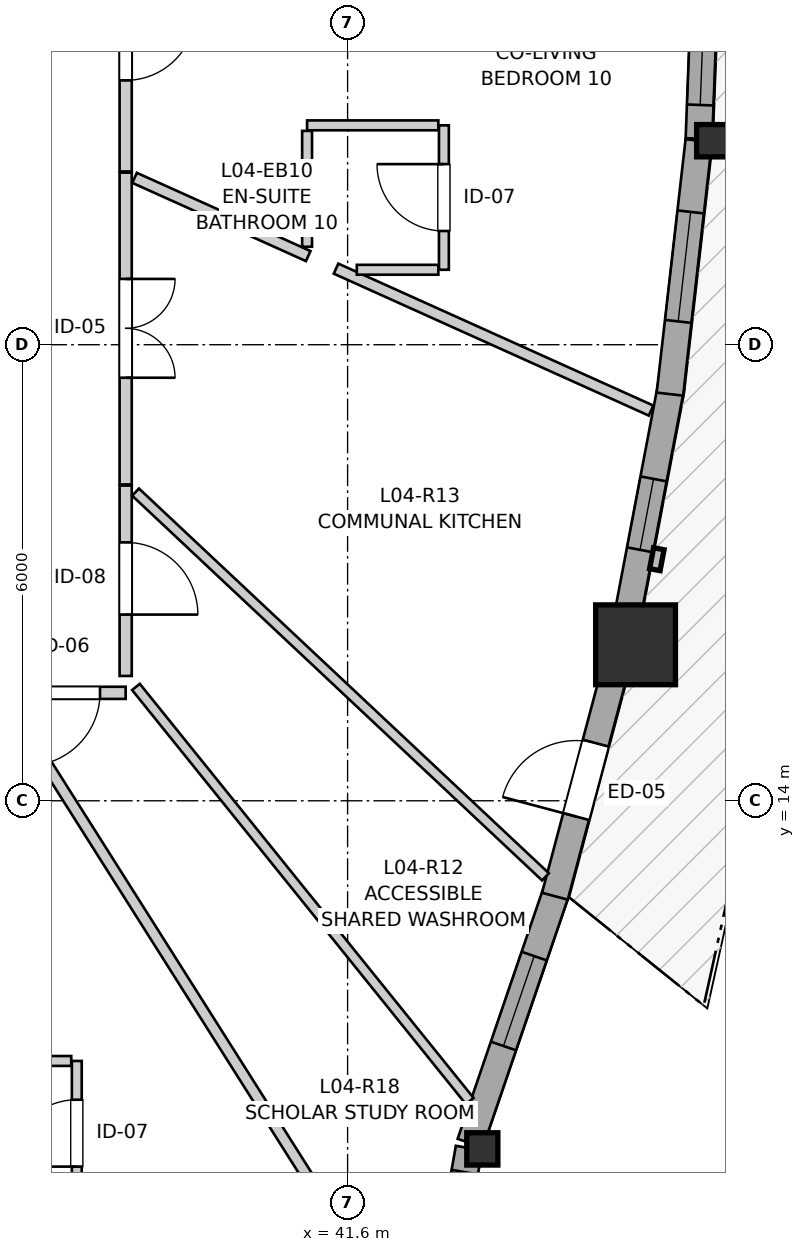
"""IFC4 building model, lengths in metres.
Left out: names, types, materials, properties, quantities, classifications, styles, units other than length and angle.
Written with IfcOpenShell. Run it as: python <this file> out.ifc"""

import sys

from ifc_helpers import new_model, si_unit, direction, frame, frame_2d, origin, origin_2d, place, context, subcontext, project, spatial, rectangle, i_section, extrude, source, transform, mapped, element, fill, save


model = new_model("IFC4")
c1 = context("Model", 3, precision=1e-05, world=origin(), true_north=direction((0.0, 1.0)))
c2 = subcontext(c1, "Body", "Model", "MODEL_VIEW")
j1 = project(units=[si_unit("LENGTHUNIT", "METRE"), si_unit("PLANEANGLEUNIT", "RADIAN")], contexts=[c1])
p1 = place(None, origin())
s1 = spatial("IfcSite", under=j1, at=p1, CompositionType="ELEMENT")
p2 = place(p1, origin())
s2 = spatial("IfcBuilding", under=s1, at=p2, CompositionType="ELEMENT")
p3 = place(p2, frame((0.0, 0.0, 17.4)))
s3 = spatial("IfcBuildingStorey", under=s2, at=p3, CompositionType="ELEMENT", Elevation=17.4)
m1 = source(origin(), c2, "Body", "SweptSolid", [
    extrude(i_section(OverallWidth=0.409, OverallDepth=0.425, WebThickness=0.03, FlangeThickness=0.048, FilletRadius=0.015, at=origin_2d()), origin(), (0.0, 0.0, 1.0), 2.94),
])
p4 = place(p3, frame((43.373, 9.42, 0.0), z_axis=(0.0, 0.0, 1.0), x_axis=(1.0, 0.0, 0.0)))
e1 = element("IfcColumn", 1, at=p4, inside=s3, PredefinedType="PILASTER", context=c2, shape_type="MappedRepresentation", body=[
    mapped(m1, transform((0.0, 0.0, 0.0), x_axis=(1.0, 0.0, 0.0), y_axis=(0.0, 1.0, 0.0), z_axis=(0.0, 0.0, 1.0), scale=1.0)),
])
m2 = source(origin(), c2, "Body", "SweptSolid", [
    extrude(rectangle(XDim=1.05, YDim=1.05, at=origin_2d()), origin(), (0.0, 0.0, 1.0), 2.94),
])
p5 = place(p3, frame((45.389, 16.052, 0.0), z_axis=(0.0, 0.0, 1.0), x_axis=(1.0, 0.0, 0.0)))
e2 = element("IfcColumn", 2, at=p5, inside=s3, PredefinedType="COLUMN", context=c2, shape_type="MappedRepresentation", body=[
    mapped(m2, transform((0.0, 0.0, 0.0), x_axis=(1.0, 0.0, 0.0), y_axis=(0.0, 1.0, 0.0), z_axis=(0.0, 0.0, 1.0), scale=1.0)),
])
p6 = place(p3, frame((46.397, 22.684, 0.0), z_axis=(0.0, 0.0, 1.0), x_axis=(1.0, 0.0, 0.0)))
e3 = element("IfcColumn", 3, at=p6, inside=s3, PredefinedType="PILASTER", context=c2, shape_type="MappedRepresentation", body=[
    mapped(m1, transform((0.0, 0.0, 0.0), x_axis=(1.0, 0.0, 0.0), y_axis=(0.0, 1.0, 0.0), z_axis=(0.0, 0.0, 1.0), scale=1.0)),
])
p7 = place(p3, frame((42.844, 7.429, 0.0), z_axis=(0.0, 0.0, 1.0), x_axis=(0.17370309897, 0.984798067326, 0.0)))
e4 = element("IfcWall", 4, at=p7, inside=s3, PredefinedType="SOLIDWALL", context=c2, shape_type="SweptSolid", body=[
    extrude(rectangle(XDim=2.032, YDim=0.35, at=frame_2d((1.016, 0.0))), origin(), (0.0, 0.0, 1.0), 2.42),
])
p8 = place(p7, frame((0.261, 0.0, 0.82)))
e5 = element("IfcOpeningElement", 5, at=p8, cuts=e4, PredefinedType="OPENING", context=c2, shape_type="SweptSolid", body=[
    extrude(rectangle(XDim=1.45, YDim=1.25, at=frame_2d((0.725, 0.625))), frame((0.0, 0.185, 0.0), z_axis=(0.0, -1.0, 0.0), x_axis=(1.0, 0.0, 0.0)), (0.0, 0.0, 1.0), 0.37),
])
p9 = place(p3, frame((43.213, 9.496, 0.0), z_axis=(0.0, 0.0, 1.0), x_axis=(0.323599506414, 0.946194144692, 0.0)))
e6 = element("IfcWall", 6, at=p9, inside=s3, PredefinedType="SOLIDWALL", context=c2, shape_type="SweptSolid", body=[
    extrude(rectangle(XDim=3.522, YDim=0.35, at=frame_2d((1.761, 0.0))), origin(), (0.0, 0.0, 1.0), 2.42),
])
p10 = place(p9, frame((1.351, 0.0, 0.82)))
e7 = element("IfcOpeningElement", 7, at=p10, cuts=e6, PredefinedType="OPENING", context=c2, shape_type="SweptSolid", body=[
    extrude(rectangle(XDim=1.25, YDim=1.35, at=frame_2d((0.625, 0.675))), frame((0.0, 0.185, 0.0), z_axis=(0.0, -1.0, 0.0), x_axis=(1.0, 0.0, 0.0)), (0.0, 0.0, 1.0), 0.37),
])
p11 = place(p3, frame((44.328, 12.744, 0.0), z_axis=(0.0, 0.0, 1.0), x_axis=(0.257063268192, 0.966394575806, 0.0)))
e8 = element("IfcWall", 8, at=p11, inside=s3, PredefinedType="SOLIDWALL", context=c2, shape_type="SweptSolid", body=[
    extrude(rectangle(XDim=3.169, YDim=0.35, at=frame_2d((1.584, 0.0))), origin(), (0.0, 0.0, 1.0), 2.42),
])
p12 = place(p11, frame((1.085, 0.0, 0.0)))
e9 = element("IfcOpeningElement", 9, at=p12, cuts=e8, PredefinedType="OPENING", context=c2, shape_type="SweptSolid", body=[
    extrude(rectangle(XDim=1.0, YDim=2.1, at=frame_2d((0.5, 1.05))), frame((0.0, 0.185, 0.0), z_axis=(0.0, -1.0, 0.0), x_axis=(1.0, 0.0, 0.0)), (0.0, 0.0, 1.0), 0.37),
])
p13 = place(p3, frame((45.273, 16.379, 0.0), z_axis=(0.0, 0.0, 1.0), x_axis=(0.186712111557, 0.982414671815, 0.0)))
e10 = element("IfcWall", 10, at=p13, inside=s3, PredefinedType="SOLIDWALL", context=c2, shape_type="SweptSolid", body=[
    extrude(rectangle(XDim=3.113, YDim=0.35, at=frame_2d((1.557, 0.0))), origin(), (0.0, 0.0, 1.0), 2.42),
])
p14 = place(p13, frame((0.939, 0.0, 0.82)))
e11 = element("IfcOpeningElement", 11, at=p14, cuts=e10, PredefinedType="OPENING", context=c2, shape_type="SweptSolid", body=[
    extrude(rectangle(XDim=0.95, YDim=1.35, at=frame_2d((0.475, 0.675))), frame((0.0, 0.185, 0.0), z_axis=(0.0, -1.0, 0.0), x_axis=(1.0, 0.0, 0.0)), (0.0, 0.0, 1.0), 0.37),
])
p15 = place(p3, frame((45.841, 19.35, 0.0), z_axis=(0.0, 0.0, 1.0), x_axis=(0.113290074291, 0.993561955324, 0.0)))
e12 = element("IfcWall", 12, at=p15, inside=s3, PredefinedType="SOLIDWALL", context=c2, shape_type="SweptSolid", body=[
    extrude(rectangle(XDim=3.355, YDim=0.35, at=frame_2d((1.678, 0.0))), origin(), (0.0, 0.0, 1.0), 2.42),
])
p16 = place(p15, frame((0.963, 0.0, 0.82)))
e13 = element("IfcOpeningElement", 13, at=p16, cuts=e12, PredefinedType="OPENING", context=c2, shape_type="SweptSolid", body=[
    extrude(rectangle(XDim=1.45, YDim=1.25, at=frame_2d((0.725, 0.625))), frame((0.0, 0.185, 0.0), z_axis=(0.0, -1.0, 0.0), x_axis=(1.0, 0.0, 0.0)), (0.0, 0.0, 1.0), 0.37),
])
p17 = place(p3, frame((46.223, 22.711, 0.0), z_axis=(0.0, 0.0, 1.0), x_axis=(0.037977854684, 0.999278581054, 0.0)))
e14 = element("IfcWall", 14, at=p17, inside=s3, PredefinedType="SOLIDWALL", context=c2, shape_type="SweptSolid", body=[
    extrude(rectangle(XDim=3.336, YDim=0.35, at=frame_2d((1.668, 0.0))), origin(), (0.0, 0.0, 1.0), 2.42),
])
p18 = place(p17, frame((0.444, 0.0, 0.82)))
e15 = element("IfcOpeningElement", 15, at=p18, cuts=e14, PredefinedType="OPENING", context=c2, shape_type="SweptSolid", body=[
    extrude(rectangle(XDim=1.75, YDim=1.3, at=frame_2d((0.875, 0.65))), frame((0.0, 0.185, 0.0), z_axis=(0.0, -1.0, 0.0), x_axis=(1.0, 0.0, 0.0)), (0.0, 0.0, 1.0), 0.37),
])
p19 = place(p3, frame((38.68, 22.264, 0.0), z_axis=(0.0, 0.0, 1.0), x_axis=(0.0, -1.0, 0.0)))
e16 = element("IfcWall", 16, at=p19, inside=s3, PredefinedType="PARTITIONING", context=c2, shape_type="SweptSolid", body=[
    extrude(rectangle(XDim=4.102, YDim=0.16, at=frame_2d((2.051, 0.0))), origin(), (0.0, 0.0, 1.0), 2.94),
])
p20 = place(p19, frame((1.398, 0.0, 0.0)))
e17 = element("IfcOpeningElement", 17, at=p20, cuts=e16, PredefinedType="OPENING", context=c2, shape_type="SweptSolid", body=[
    extrude(rectangle(XDim=1.3, YDim=2.1, at=frame_2d((0.65, 1.05))), frame((0.0, 0.09, 0.0), z_axis=(0.0, -1.0, 0.0), x_axis=(1.0, 0.0, 0.0)), (0.0, 0.0, 1.0), 0.18),
])
p21 = place(p3, frame((38.68, 25.642, 0.0), z_axis=(0.0, 0.0, 1.0), x_axis=(0.0, -1.0, 0.0)))
e18 = element("IfcWall", 18, at=p21, inside=s3, PredefinedType="PARTITIONING", context=c2, shape_type="SweptSolid", body=[
    extrude(rectangle(XDim=3.363, YDim=0.16, at=frame_2d((1.682, 0.0))), origin(), (0.0, 0.0, 1.0), 2.94),
])
p22 = place(p21, frame((1.244, 0.0, 0.0)))
e19 = element("IfcOpeningElement", 19, at=p22, cuts=e18, PredefinedType="OPENING", context=c2, shape_type="SweptSolid", body=[
    extrude(rectangle(XDim=0.92, YDim=2.1, at=frame_2d((0.46, 1.05))), frame((0.0, 0.09, 0.0), z_axis=(0.0, -1.0, 0.0), x_axis=(1.0, 0.0, 0.0)), (0.0, 0.0, 1.0), 0.18),
])
p23 = place(p3, frame((38.68, 18.147, 0.0), z_axis=(0.0, 0.0, 1.0), x_axis=(0.0, -1.0, 0.0)))
e20 = element("IfcWall", 20, at=p23, inside=s3, PredefinedType="PARTITIONING", context=c2, shape_type="SweptSolid", body=[
    extrude(rectangle(XDim=2.505, YDim=0.16, at=frame_2d((1.252, 0.0))), origin(), (0.0, 0.0, 1.0), 2.94),
])
p24 = place(p23, frame((0.748, 0.0, 0.0)))
e21 = element("IfcOpeningElement", 21, at=p24, cuts=e20, PredefinedType="OPENING", context=c2, shape_type="SweptSolid", body=[
    extrude(rectangle(XDim=0.95, YDim=2.1, at=frame_2d((0.475, 1.05))), frame((0.0, 0.09, 0.0), z_axis=(0.0, -1.0, 0.0), x_axis=(1.0, 0.0, 0.0)), (0.0, 0.0, 1.0), 0.18),
])
p25 = place(p3, frame((38.037, 8.75, 0.0), z_axis=(0.0, 0.0, 1.0), x_axis=(0.0, 1.0, 0.0)))
e22 = element("IfcWall", 22, at=p25, inside=s3, PredefinedType="PARTITIONING", context=c2, shape_type="SweptSolid", body=[
    extrude(rectangle(XDim=1.827, YDim=0.13, at=frame_2d((0.914, 0.0))), origin(), (0.0, 0.0, 1.0), 2.94),
])
p26 = place(p25, frame((0.437, 0.0, 0.0)))
e23 = element("IfcOpeningElement", 23, at=p26, cuts=e22, PredefinedType="OPENING", context=c2, shape_type="SweptSolid", body=[
    extrude(rectangle(XDim=0.88, YDim=2.05, at=frame_2d((0.44, 1.025))), frame((0.0, 0.075, 0.0), z_axis=(0.0, -1.0, 0.0), x_axis=(1.0, 0.0, 0.0)), (0.0, 0.0, 1.0), 0.15),
])
p27 = place(p3, frame((42.867, 20.986, 0.0), z_axis=(0.0, 0.0, 1.0), x_axis=(0.0, 1.0, 0.0)))
e24 = element("IfcWall", 24, at=p27, inside=s3, PredefinedType="PARTITIONING", context=c2, shape_type="SweptSolid", body=[
    extrude(rectangle(XDim=1.9, YDim=0.13, at=frame_2d((0.95, 0.0))), origin(), (0.0, 0.0, 1.0), 2.508),
])
p28 = place(p27, frame((0.51, 0.0, 0.0)))
e25 = element("IfcOpeningElement", 25, at=p28, cuts=e24, PredefinedType="OPENING", context=c2, shape_type="SweptSolid", body=[
    extrude(rectangle(XDim=0.88, YDim=2.05, at=frame_2d((0.44, 1.025))), frame((0.0, 0.075, 0.0), z_axis=(0.0, -1.0, 0.0), x_axis=(1.0, 0.0, 0.0)), (0.0, 0.0, 1.0), 0.15),
])
p29 = place(p3, frame((38.68, 15.42, 0.0), z_axis=(0.0, 0.0, 1.0), x_axis=(-1.0, 0.0, 0.0)))
e26 = element("IfcWall", 26, at=p29, inside=s3, PredefinedType="PARTITIONING", context=c2, shape_type="SweptSolid", body=[
    extrude(rectangle(XDim=1.602, YDim=0.16, at=frame_2d((0.801, 0.0))), origin(), (0.0, 0.0, 1.0), 2.94),
])
p30 = place(p29, frame((0.337, 0.0, 0.0)))
e27 = element("IfcOpeningElement", 27, at=p30, cuts=e26, PredefinedType="OPENING", context=c2, shape_type="SweptSolid", body=[
    extrude(rectangle(XDim=0.96, YDim=2.1, at=frame_2d((0.48, 1.05))), frame((0.0, 0.09, 0.0), z_axis=(0.0, -1.0, 0.0), x_axis=(1.0, 0.0, 0.0)), (0.0, 0.0, 1.0), 0.18),
])
p31 = place(p3, frame((37.125, 15.294, 0.0), z_axis=(0.0, 0.0, 1.0), x_axis=(0.534743765269, -0.845014263492, 0.0)))
e28 = element("IfcWall", 28, at=p31, inside=s3, PredefinedType="PARTITIONING", context=c2, shape_type="SweptSolid", body=[
    extrude(rectangle(XDim=9.797, YDim=0.145, at=frame_2d((4.899, 0.0))), origin(), (0.0, 0.0, 1.0), 2.94),
])
p32 = place(p3, frame((38.81, 18.061, 0.0), z_axis=(0.0, 0.0, 1.0), x_axis=(0.729196389153, -0.684304483433, 0.0)))
e29 = element("IfcWall", 29, at=p32, inside=s3, PredefinedType="PARTITIONING", context=c2, shape_type="SweptSolid", body=[
    extrude(rectangle(XDim=7.396, YDim=0.13, at=frame_2d((3.698, 0.0))), origin(), (0.0, 0.0, 1.0), 2.94),
])
p33 = place(p3, frame((38.816, 15.498, 0.0), z_axis=(0.0, 0.0, 1.0), x_axis=(0.627528755525, -0.778593386171, 0.0)))
e30 = element("IfcWall", 30, at=p33, inside=s3, PredefinedType="PARTITIONING", context=c2, shape_type="SweptSolid", body=[
    extrude(rectangle(XDim=6.998, YDim=0.13, at=frame_2d((3.499, 0.0))), origin(), (0.0, 0.0, 1.0), 2.94),
])
p34 = place(p3, frame((41.448, 21.001, 0.0), z_axis=(0.0, 0.0, 1.0), x_axis=(0.911733501253, -0.410782208346, 0.0)))
e31 = element("IfcWall", 31, at=p34, inside=s3, PredefinedType="PARTITIONING", context=c2, shape_type="SweptSolid", body=[
    extrude(rectangle(XDim=4.546, YDim=0.145, at=frame_2d((2.273, 0.0))), origin(), (0.0, 0.0, 1.0), 2.94),
])
p35 = place(p3, frame((38.797, 22.195, 0.0), z_axis=(0.0, 0.0, 1.0), x_axis=(0.911759201305, -0.410725162165, 0.0)))
e32 = element("IfcWall", 32, at=p35, inside=s3, PredefinedType="PARTITIONING", context=c2, shape_type="SweptSolid", body=[
    extrude(rectangle(XDim=2.506, YDim=0.145, at=frame_2d((1.253, 0.0))), origin(), (0.0, 0.0, 1.0), 2.94),
])
p36 = place(p3, frame((36.347, 10.577, 0.0), z_axis=(0.0, 0.0, 1.0), x_axis=(1.0, 0.0, 0.0)))
e33 = element("IfcWall", 33, at=p36, inside=s3, PredefinedType="PARTITIONING", context=c2, shape_type="SweptSolid", body=[
    extrude(rectangle(XDim=1.617, YDim=0.13, at=frame_2d((0.808, 0.0))), origin(), (0.0, 0.0, 1.0), 2.94),
])
p37 = place(p3, frame((41.067, 22.886, 0.0), z_axis=(0.0, 0.0, 1.0), x_axis=(1.0, 0.0, 0.0)))
e34 = element("IfcWall", 34, at=p37, inside=s3, PredefinedType="PARTITIONING", context=c2, shape_type="SweptSolid", body=[
    extrude(rectangle(XDim=1.727, YDim=0.13, at=frame_2d((0.864, 0.0))), origin(), (0.0, 0.0, 1.0), 2.94),
])
p38 = place(p3, frame((41.067, 21.289, 0.0), z_axis=(0.0, 0.0, 1.0), x_axis=(0.0, 1.0, 0.0)))
e35 = element("IfcWall", 35, at=p38, inside=s3, PredefinedType="PARTITIONING", context=c2, shape_type="SweptSolid", body=[
    extrude(rectangle(XDim=1.524, YDim=0.13, at=frame_2d((0.762, 0.0))), origin(), (0.0, 0.0, 1.0), 2.94),
])
p39 = place(p3, frame((41.721, 20.986, 0.0), z_axis=(0.0, 0.0, 1.0), x_axis=(1.0, 0.0, 0.0)))
e36 = element("IfcWall", 36, at=p39, inside=s3, PredefinedType="PARTITIONING", context=c2, shape_type="SweptSolid", body=[
    extrude(rectangle(XDim=1.073, YDim=0.13, at=frame_2d((0.537, 0.0))), origin(), (0.0, 0.0, 1.0), 2.94),
])
m3 = source(origin(), c2, "Body", "SweptSolid", [
    extrude(rectangle(XDim=1.45, YDim=1.25, at=frame_2d((0.725, 0.625))), frame((0.0, 0.03, 0.0), z_axis=(0.0, -1.0, 0.0), x_axis=(1.0, 0.0, 0.0)), (0.0, 0.0, 1.0), 0.06),
])
p40 = place(p8, origin())
e37 = element("IfcWindow", 37, at=p40, inside=s3, PartitioningType="SINGLE_PANEL", PredefinedType="WINDOW", context=c2, shape_type="MappedRepresentation", body=[
    mapped(m3, transform((0.0, 0.0, 0.0), x_axis=(1.0, 0.0, 0.0), y_axis=(0.0, 1.0, 0.0), z_axis=(0.0, 0.0, 1.0), scale=1.0)),
])
fill(e5, e37)
m4 = source(origin(), c2, "Body", "SweptSolid", [
    extrude(rectangle(XDim=1.25, YDim=1.35, at=frame_2d((0.625, 0.675))), frame((0.0, 0.03, 0.0), z_axis=(0.0, -1.0, 0.0), x_axis=(1.0, 0.0, 0.0)), (0.0, 0.0, 1.0), 0.06),
])
p41 = place(p10, origin())
e38 = element("IfcWindow", 38, at=p41, inside=s3, PartitioningType="SINGLE_PANEL", PredefinedType="WINDOW", context=c2, shape_type="MappedRepresentation", body=[
    mapped(m4, transform((0.0, 0.0, 0.0), x_axis=(1.0, 0.0, 0.0), y_axis=(0.0, 1.0, 0.0), z_axis=(0.0, 0.0, 1.0), scale=1.0)),
])
fill(e7, e38)
m5 = source(origin(), c2, "Body", "SweptSolid", [
    extrude(rectangle(XDim=0.95, YDim=1.35, at=frame_2d((0.475, 0.675))), frame((0.0, 0.03, 0.0), z_axis=(0.0, -1.0, 0.0), x_axis=(1.0, 0.0, 0.0)), (0.0, 0.0, 1.0), 0.06),
])
p42 = place(p14, origin())
e39 = element("IfcWindow", 39, at=p42, inside=s3, PartitioningType="SINGLE_PANEL", PredefinedType="WINDOW", context=c2, shape_type="MappedRepresentation", body=[
    mapped(m5, transform((0.0, 0.0, 0.0), x_axis=(1.0, 0.0, 0.0), y_axis=(0.0, 1.0, 0.0), z_axis=(0.0, 0.0, 1.0), scale=1.0)),
])
fill(e11, e39)
p43 = place(p16, origin())
e40 = element("IfcWindow", 40, at=p43, inside=s3, PartitioningType="SINGLE_PANEL", PredefinedType="WINDOW", context=c2, shape_type="MappedRepresentation", body=[
    mapped(m3, transform((0.0, 0.0, 0.0), x_axis=(1.0, 0.0, 0.0), y_axis=(0.0, 1.0, 0.0), z_axis=(0.0, 0.0, 1.0), scale=1.0)),
])
fill(e13, e40)
m6 = source(origin(), c2, "Body", "SweptSolid", [
    extrude(rectangle(XDim=1.75, YDim=1.3, at=frame_2d((0.875, 0.65))), frame((0.0, 0.03, 0.0), z_axis=(0.0, -1.0, 0.0), x_axis=(1.0, 0.0, 0.0)), (0.0, 0.0, 1.0), 0.06),
])
p44 = place(p18, origin())
e41 = element("IfcWindow", 41, at=p44, inside=s3, PartitioningType="SINGLE_PANEL", PredefinedType="WINDOW", context=c2, shape_type="MappedRepresentation", body=[
    mapped(m6, transform((0.0, 0.0, 0.0), x_axis=(1.0, 0.0, 0.0), y_axis=(0.0, 1.0, 0.0), z_axis=(0.0, 0.0, 1.0), scale=1.0)),
])
fill(e15, e41)
m7 = source(origin(), c2, "Body", "SweptSolid", [
    extrude(rectangle(XDim=1.0, YDim=2.1, at=frame_2d((0.5, 1.05))), frame((0.0, 0.025, 0.0), z_axis=(0.0, -1.0, 0.0), x_axis=(1.0, 0.0, 0.0)), (0.0, 0.0, 1.0), 0.05),
])
p45 = place(p12, origin())
e42 = element("IfcDoor", 42, at=p45, inside=s3, OperationType="SINGLE_SWING_LEFT", PredefinedType="DOOR", context=c2, shape_type="MappedRepresentation", body=[
    mapped(m7, transform((0.0, 0.0, 0.0), x_axis=(1.0, 0.0, 0.0), y_axis=(0.0, 1.0, 0.0), z_axis=(0.0, 0.0, 1.0), scale=1.0)),
])
fill(e9, e42)
m8 = source(origin(), c2, "Body", "SweptSolid", [
    extrude(rectangle(XDim=1.3, YDim=2.1, at=frame_2d((0.65, 1.05))), frame((0.0, 0.025, 0.0), z_axis=(0.0, -1.0, 0.0), x_axis=(1.0, 0.0, 0.0)), (0.0, 0.0, 1.0), 0.05),
])
p46 = place(p20, origin())
e43 = element("IfcDoor", 43, at=p46, inside=s3, OperationType="DOUBLE_DOOR_SINGLE_SWING", PredefinedType="DOOR", context=c2, shape_type="MappedRepresentation", body=[
    mapped(m8, transform((0.0, 0.0, 0.0), x_axis=(1.0, 0.0, 0.0), y_axis=(0.0, 1.0, 0.0), z_axis=(0.0, 0.0, 1.0), scale=1.0)),
])
fill(e17, e43)
m9 = source(origin(), c2, "Body", "SweptSolid", [
    extrude(rectangle(XDim=0.92, YDim=2.1, at=frame_2d((0.46, 1.05))), frame((0.0, 0.025, 0.0), z_axis=(0.0, -1.0, 0.0), x_axis=(1.0, 0.0, 0.0)), (0.0, 0.0, 1.0), 0.05),
])
p47 = place(p22, origin())
e44 = element("IfcDoor", 44, at=p47, inside=s3, OperationType="SINGLE_SWING_LEFT", PredefinedType="DOOR", context=c2, shape_type="MappedRepresentation", body=[
    mapped(m9, transform((0.0, 0.0, 0.0), x_axis=(1.0, 0.0, 0.0), y_axis=(0.0, 1.0, 0.0), z_axis=(0.0, 0.0, 1.0), scale=1.0)),
])
fill(e19, e44)
m10 = source(origin(), c2, "Body", "SweptSolid", [
    extrude(rectangle(XDim=0.95, YDim=2.1, at=frame_2d((0.475, 1.05))), frame((0.0, 0.025, 0.0), z_axis=(0.0, -1.0, 0.0), x_axis=(1.0, 0.0, 0.0)), (0.0, 0.0, 1.0), 0.05),
])
p48 = place(p24, origin())
e45 = element("IfcDoor", 45, at=p48, inside=s3, OperationType="SINGLE_SWING_RIGHT", PredefinedType="DOOR", context=c2, shape_type="MappedRepresentation", body=[
    mapped(m10, transform((0.0, 0.0, 0.0), x_axis=(1.0, 0.0, 0.0), y_axis=(0.0, 1.0, 0.0), z_axis=(0.0, 0.0, 1.0), scale=1.0)),
])
fill(e21, e45)
m11 = source(origin(), c2, "Body", "SweptSolid", [
    extrude(rectangle(XDim=0.88, YDim=2.05, at=frame_2d((0.44, 1.025))), frame((0.0, 0.025, 0.0), z_axis=(0.0, -1.0, 0.0), x_axis=(1.0, 0.0, 0.0)), (0.0, 0.0, 1.0), 0.05),
])
p49 = place(p26, origin())
e46 = element("IfcDoor", 46, at=p49, inside=s3, OperationType="SINGLE_SWING_LEFT", PredefinedType="DOOR", context=c2, shape_type="MappedRepresentation", body=[
    mapped(m11, transform((0.0, 0.0, 0.0), x_axis=(1.0, 0.0, 0.0), y_axis=(0.0, 1.0, 0.0), z_axis=(0.0, 0.0, 1.0), scale=1.0)),
])
fill(e23, e46)
p50 = place(p28, origin())
e47 = element("IfcDoor", 47, at=p50, inside=s3, OperationType="SINGLE_SWING_RIGHT", PredefinedType="DOOR", context=c2, shape_type="MappedRepresentation", body=[
    mapped(m11, transform((0.0, 0.0, 0.0), x_axis=(1.0, 0.0, 0.0), y_axis=(0.0, 1.0, 0.0), z_axis=(0.0, 0.0, 1.0), scale=1.0)),
])
fill(e25, e47)
m12 = source(origin(), c2, "Body", "SweptSolid", [
    extrude(rectangle(XDim=0.96, YDim=2.1, at=frame_2d((0.48, 1.05))), frame((0.0, 0.025, 0.0), z_axis=(0.0, -1.0, 0.0), x_axis=(1.0, 0.0, 0.0)), (0.0, 0.0, 1.0), 0.05),
])
p51 = place(p30, origin())
e48 = element("IfcDoor", 48, at=p51, inside=s3, OperationType="SINGLE_SWING_RIGHT", PredefinedType="DOOR", context=c2, shape_type="MappedRepresentation", body=[
    mapped(m12, transform((0.0, 0.0, 0.0), x_axis=(1.0, 0.0, 0.0), y_axis=(0.0, 1.0, 0.0), z_axis=(0.0, 0.0, 1.0), scale=1.0)),
])
fill(e27, e48)
save(model, sys.argv[1])
